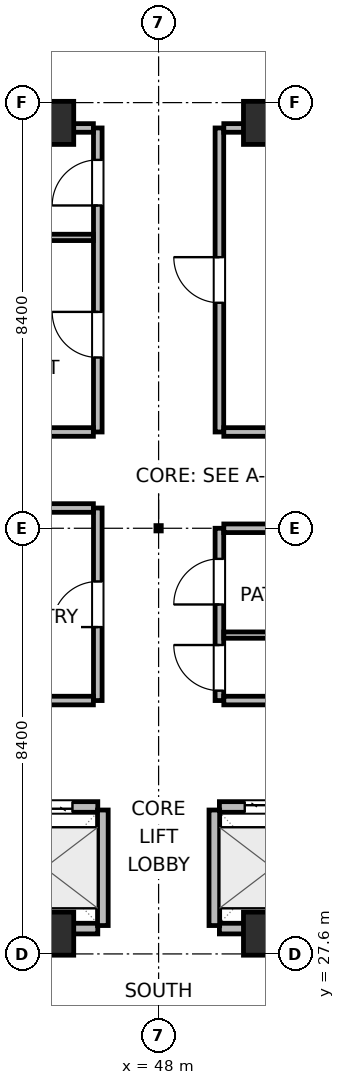
"""IFC4 building model, lengths in metres.
Left out: names, types, materials, properties, quantities, classifications, styles, units other than length and angle.
Written with IfcOpenShell. Run it as: python <this file> out.ifc"""

import sys

from ifc_helpers import new_model, si_unit, direction, frame, frame_2d, origin, origin_2d, place, context, subcontext, project, spatial, rectangle, extrude, element, fill, save


model = new_model("IFC4")
c1 = context("Model", 3, precision=1e-05, world=origin(), true_north=direction((0.0, 1.0)))
c2 = subcontext(c1, "Body", "Model", "MODEL_VIEW")
j1 = project(units=[si_unit("LENGTHUNIT", "METRE"), si_unit("PLANEANGLEUNIT", "RADIAN")], contexts=[c1])
p1 = place(None, origin())
s1 = spatial("IfcSite", under=j1, at=p1, CompositionType="ELEMENT")
p2 = place(p1, origin())
s2 = spatial("IfcBuilding", under=s1, at=p2, CompositionType="ELEMENT")
p3 = place(p2, frame((0.0, 0.0, 25.5)))
s3 = spatial("IfcBuildingStorey", under=s2, at=p3, CompositionType="ELEMENT", Elevation=25.5)
for number, where, z_axis, x_axis in (
    (1, (45.9, 28.0, 0.0), (0.0, 0.0, 1.0), (1.0, 0.0, 0.0)),
    (2, (50.1, 28.0, 0.0), (0.0, 0.0, 1.0), (1.0, 0.0, 0.0)),
    (3, (45.9, 44.0, 0.0), (0.0, 0.0, 1.0), (1.0, 0.0, 0.0)),
    (4, (50.1, 44.0, 0.0), (0.0, 0.0, 1.0), (1.0, 0.0, 0.0)),
):
    element("IfcColumn", number, at=place(p3, frame(where, z_axis=z_axis, x_axis=x_axis)), inside=s3, PredefinedType="COLUMN", context=c2, shape_type="SweptSolid", body=[
        extrude(rectangle(XDim=0.85, YDim=0.85, at=origin_2d()), origin(), (0.0, 0.0, 1.0), 3.9),
    ])
p4 = place(p3, frame((44.7, 30.5, 0.0), z_axis=(0.0, 0.0, 1.0), x_axis=(1.0, 0.0, 0.0)))
e5 = element("IfcWall", 5, at=p4, inside=s3, PredefinedType="PARTITIONING", context=c2, shape_type="SweptSolid", body=[
    extrude(rectangle(XDim=2.1, YDim=0.21, at=frame_2d((1.05, 0.0))), origin(), (0.0, 0.0, 1.0), 3.64),
])
p5 = place(p4, frame((0.5, 0.0, 0.0)))
e6 = element("IfcOpeningElement", 6, at=p5, cuts=e5, PredefinedType="OPENING", context=c2, shape_type="SweptSolid", body=[
    extrude(rectangle(XDim=1.1, YDim=2.04, at=frame_2d((0.55, 1.02))), frame((0.0, 0.115, 0.0), z_axis=(0.0, -1.0, 0.0), x_axis=(1.0, 0.0, 0.0)), (0.0, 0.0, 1.0), 0.23),
])
p6 = place(p3, frame((44.7, 28.1, 0.0), z_axis=(0.0, 0.0, 1.0), x_axis=(1.0, 0.0, 0.0)))
e7 = element("IfcWall", 7, at=p6, inside=s3, PredefinedType="PARTITIONING", context=c2, shape_type="SweptSolid", body=[
    extrude(rectangle(XDim=2.1, YDim=0.21, at=frame_2d((1.05, 0.0))), origin(), (0.0, 0.0, 1.0), 2.525),
])
p7 = place(p3, frame((46.9, 28.16, 0.0), z_axis=(0.0, 0.0, 1.0), x_axis=(0.0, 1.0, 0.0)))
e8 = element("IfcWall", 8, at=p7, inside=s3, PredefinedType="PARTITIONING", context=c2, shape_type="SweptSolid", body=[
    extrude(rectangle(XDim=2.28, YDim=0.21, at=frame_2d((1.14, 0.0))), origin(), (0.0, 0.0, 1.0), 3.64),
])
p8 = place(p3, frame((49.2, 30.5, 0.0), z_axis=(0.0, 0.0, 1.0), x_axis=(1.0, 0.0, 0.0)))
e9 = element("IfcWall", 9, at=p8, inside=s3, PredefinedType="PARTITIONING", context=c2, shape_type="SweptSolid", body=[
    extrude(rectangle(XDim=2.1, YDim=0.21, at=frame_2d((1.05, 0.0))), origin(), (0.0, 0.0, 1.0), 3.64),
])
p9 = place(p8, frame((0.5, 0.0, 0.0)))
e10 = element("IfcOpeningElement", 10, at=p9, cuts=e9, PredefinedType="OPENING", context=c2, shape_type="SweptSolid", body=[
    extrude(rectangle(XDim=1.1, YDim=2.04, at=frame_2d((0.55, 1.02))), frame((0.0, 0.115, 0.0), z_axis=(0.0, -1.0, 0.0), x_axis=(1.0, 0.0, 0.0)), (0.0, 0.0, 1.0), 0.23),
])
p10 = place(p3, frame((49.2, 28.1, 0.0), z_axis=(0.0, 0.0, 1.0), x_axis=(1.0, 0.0, 0.0)))
e11 = element("IfcWall", 11, at=p10, inside=s3, PredefinedType="PARTITIONING", context=c2, shape_type="SweptSolid", body=[
    extrude(rectangle(XDim=2.1, YDim=0.21, at=frame_2d((1.05, 0.0))), origin(), (0.0, 0.0, 1.0), 2.525),
])
p11 = place(p3, frame((49.1, 28.16, 0.0), z_axis=(0.0, 0.0, 1.0), x_axis=(0.0, 1.0, 0.0)))
e12 = element("IfcWall", 12, at=p11, inside=s3, PredefinedType="PARTITIONING", context=c2, shape_type="SweptSolid", body=[
    extrude(rectangle(XDim=2.28, YDim=0.21, at=frame_2d((1.14, 0.0))), origin(), (0.0, 0.0, 1.0), 3.64),
])
p12 = place(p3, frame((46.8, 32.6, 0.0), z_axis=(0.0, 0.0, 1.0), x_axis=(0.0, 1.0, 0.0)))
e13 = element("IfcWall", 13, at=p12, inside=s3, PredefinedType="PARTITIONING", context=c2, shape_type="SweptSolid", body=[
    extrude(rectangle(XDim=3.8, YDim=0.17, at=frame_2d((1.9, 0.0))), origin(), (0.0, 0.0, 1.0), 3.64),
])
p13 = place(p12, frame((1.45, 0.0, 0.0)))
e14 = element("IfcOpeningElement", 14, at=p13, cuts=e13, PredefinedType="OPENING", context=c2, shape_type="SweptSolid", body=[
    extrude(rectangle(XDim=0.9, YDim=2.02, at=frame_2d((0.45, 1.01))), frame((0.0, 0.095, 0.0), z_axis=(0.0, -1.0, 0.0), x_axis=(1.0, 0.0, 0.0)), (0.0, 0.0, 1.0), 0.19),
])
for number, where, z_axis, x_axis in (
    (15, (43.8, 32.6, 0.0), (0.0, 0.0, 1.0), (1.0, 0.0, 0.0)),
    (16, (43.8, 36.4, 0.0), (0.0, 0.0, 1.0), (1.0, 0.0, 0.0)),
):
    element("IfcWall", number, at=place(p3, frame(where, z_axis=z_axis, x_axis=x_axis)), inside=s3, PredefinedType="PARTITIONING", context=c2, shape_type="SweptSolid", body=[
        extrude(rectangle(XDim=2.913, YDim=0.17, at=frame_2d((1.457, 0.0))), origin(), (0.0, 0.0, 1.0), 3.64),
    ])
p14 = place(p3, frame((49.2, 32.6, 0.0), z_axis=(0.0, 0.0, 1.0), x_axis=(0.0, 1.0, 0.0)))
e17 = element("IfcWall", 17, at=p14, inside=s3, PredefinedType="PARTITIONING", context=c2, shape_type="SweptSolid", body=[
    extrude(rectangle(XDim=3.4, YDim=0.17, at=frame_2d((1.7, 0.0))), origin(), (0.0, 0.0, 1.0), 3.64),
])
p15 = place(p14, frame((0.196, 0.0, 0.0)))
e18 = element("IfcOpeningElement", 18, at=p15, cuts=e17, PredefinedType="OPENING", context=c2, shape_type="SweptSolid", body=[
    extrude(rectangle(XDim=0.9, YDim=2.02, at=frame_2d((0.45, 1.01))), frame((0.0, 0.095, 0.0), z_axis=(0.0, -1.0, 0.0), x_axis=(1.0, 0.0, 0.0)), (0.0, 0.0, 1.0), 0.19),
])
p16 = place(p14, frame((1.896, 0.0, 0.0)))
e19 = element("IfcOpeningElement", 19, at=p16, cuts=e17, PredefinedType="OPENING", context=c2, shape_type="SweptSolid", body=[
    extrude(rectangle(XDim=0.9, YDim=2.02, at=frame_2d((0.45, 1.01))), frame((0.0, 0.095, 0.0), z_axis=(0.0, -1.0, 0.0), x_axis=(1.0, 0.0, 0.0)), (0.0, 0.0, 1.0), 0.19),
])
for number, where, z_axis, x_axis in (
    (20, (49.287, 32.6, 0.0), (0.0, 0.0, 1.0), (1.0, 0.0, 0.0)),
    (21, (49.287, 36.0, 0.0), (0.0, 0.0, 1.0), (1.0, 0.0, 0.0)),
):
    element("IfcWall", number, at=place(p3, frame(where, z_axis=z_axis, x_axis=x_axis)), inside=s3, PredefinedType="PARTITIONING", context=c2, shape_type="SweptSolid", body=[
        extrude(rectangle(XDim=2.913, YDim=0.17, at=frame_2d((1.457, 0.0))), origin(), (0.0, 0.0, 1.0), 3.64),
    ])
p17 = place(p3, frame((49.287, 33.892, 0.0), z_axis=(0.0, 0.0, 1.0), x_axis=(1.0, 0.0, 0.0)))
e22 = element("IfcWall", 22, at=p17, inside=s3, PredefinedType="PARTITIONING", context=c2, shape_type="SweptSolid", body=[
    extrude(rectangle(XDim=2.913, YDim=0.125, at=frame_2d((1.457, 0.0))), origin(), (0.0, 0.0, 1.0), 3.64),
])
p18 = place(p3, frame((46.8, 37.9, 0.0), z_axis=(0.0, 0.0, 1.0), x_axis=(0.0, 1.0, 0.0)))
e23 = element("IfcWall", 23, at=p18, inside=s3, PredefinedType="PARTITIONING", context=c2, shape_type="SweptSolid", body=[
    extrude(rectangle(XDim=6.0, YDim=0.17, at=frame_2d((3.0, 0.0))), origin(), (0.0, 0.0, 1.0), 3.64),
])
p19 = place(p18, frame((1.47, 0.0, 0.0)))
e24 = element("IfcOpeningElement", 24, at=p19, cuts=e23, PredefinedType="OPENING", context=c2, shape_type="SweptSolid", body=[
    extrude(rectangle(XDim=0.9, YDim=2.02, at=frame_2d((0.45, 1.01))), frame((0.0, 0.095, 0.0), z_axis=(0.0, -1.0, 0.0), x_axis=(1.0, 0.0, 0.0)), (0.0, 0.0, 1.0), 0.19),
])
p20 = place(p18, frame((4.47, 0.0, 0.0)))
e25 = element("IfcOpeningElement", 25, at=p20, cuts=e23, PredefinedType="OPENING", context=c2, shape_type="SweptSolid", body=[
    extrude(rectangle(XDim=0.9, YDim=2.02, at=frame_2d((0.45, 1.01))), frame((0.0, 0.095, 0.0), z_axis=(0.0, -1.0, 0.0), x_axis=(1.0, 0.0, 0.0)), (0.0, 0.0, 1.0), 0.19),
])
p21 = place(p3, frame((42.5, 37.9, 0.0), z_axis=(0.0, 0.0, 1.0), x_axis=(1.0, 0.0, 0.0)))
e26 = element("IfcWall", 26, at=p21, inside=s3, PredefinedType="PARTITIONING", context=c2, shape_type="SweptSolid", body=[
    extrude(rectangle(XDim=4.213, YDim=0.17, at=frame_2d((2.106, 0.0))), origin(), (0.0, 0.0, 1.0), 3.64),
])
p22 = place(p3, frame((42.5, 43.9, 0.0), z_axis=(0.0, 0.0, 1.0), x_axis=(1.0, 0.0, 0.0)))
e27 = element("IfcWall", 27, at=p22, inside=s3, PredefinedType="PARTITIONING", context=c2, shape_type="SweptSolid", body=[
    extrude(rectangle(XDim=4.213, YDim=0.17, at=frame_2d((2.106, 0.0))), origin(), (0.0, 0.0, 1.0), 2.525),
])
p23 = place(p3, frame((42.5, 41.74, 0.0), z_axis=(0.0, 0.0, 1.0), x_axis=(1.0, 0.0, 0.0)))
e28 = element("IfcWall", 28, at=p23, inside=s3, PredefinedType="PARTITIONING", context=c2, shape_type="SweptSolid", body=[
    extrude(rectangle(XDim=4.213, YDim=0.125, at=frame_2d((2.106, 0.0))), origin(), (0.0, 0.0, 1.0), 3.64),
])
p24 = place(p3, frame((49.2, 37.9, 0.0), z_axis=(0.0, 0.0, 1.0), x_axis=(0.0, 1.0, 0.0)))
e29 = element("IfcWall", 29, at=p24, inside=s3, PredefinedType="PARTITIONING", context=c2, shape_type="SweptSolid", body=[
    extrude(rectangle(XDim=6.0, YDim=0.17, at=frame_2d((3.0, 0.0))), origin(), (0.0, 0.0, 1.0), 3.64),
])
p25 = place(p24, frame((2.55, 0.0, 0.0)))
e30 = element("IfcOpeningElement", 30, at=p25, cuts=e29, PredefinedType="OPENING", context=c2, shape_type="SweptSolid", body=[
    extrude(rectangle(XDim=0.9, YDim=2.02, at=frame_2d((0.45, 1.01))), frame((0.0, 0.095, 0.0), z_axis=(0.0, -1.0, 0.0), x_axis=(1.0, 0.0, 0.0)), (0.0, 0.0, 1.0), 0.19),
])
p26 = place(p3, frame((49.287, 37.9, 0.0), z_axis=(0.0, 0.0, 1.0), x_axis=(1.0, 0.0, 0.0)))
e31 = element("IfcWall", 31, at=p26, inside=s3, PredefinedType="PARTITIONING", context=c2, shape_type="SweptSolid", body=[
    extrude(rectangle(XDim=4.113, YDim=0.17, at=frame_2d((2.056, 0.0))), origin(), (0.0, 0.0, 1.0), 3.64),
])
p27 = place(p3, frame((49.287, 43.9, 0.0), z_axis=(0.0, 0.0, 1.0), x_axis=(1.0, 0.0, 0.0)))
e32 = element("IfcWall", 32, at=p27, inside=s3, PredefinedType="PARTITIONING", context=c2, shape_type="SweptSolid", body=[
    extrude(rectangle(XDim=4.113, YDim=0.17, at=frame_2d((2.056, 0.0))), origin(), (0.0, 0.0, 1.0), 2.525),
])
p28 = place(p5, origin())
e33 = element("IfcDoor", 33, at=p28, inside=s3, OperationType="DOUBLE_DOOR_SLIDING", PredefinedType="DOOR", context=c2, shape_type="SweptSolid", body=[
    extrude(rectangle(XDim=1.1, YDim=2.04, at=frame_2d((0.55, 1.02))), frame((0.0, 0.025, 0.0), z_axis=(0.0, -1.0, 0.0), x_axis=(1.0, 0.0, 0.0)), (0.0, 0.0, 1.0), 0.05),
])
fill(e6, e33)
p29 = place(p9, origin())
e34 = element("IfcDoor", 34, at=p29, inside=s3, OperationType="DOUBLE_DOOR_SLIDING", PredefinedType="DOOR", context=c2, shape_type="SweptSolid", body=[
    extrude(rectangle(XDim=1.1, YDim=2.04, at=frame_2d((0.55, 1.02))), frame((0.0, 0.025, 0.0), z_axis=(0.0, -1.0, 0.0), x_axis=(1.0, 0.0, 0.0)), (0.0, 0.0, 1.0), 0.05),
])
fill(e10, e34)
p30 = place(p13, origin())
e35 = element("IfcDoor", 35, at=p30, inside=s3, OperationType="SINGLE_SWING_LEFT", PredefinedType="DOOR", context=c2, shape_type="SweptSolid", body=[
    extrude(rectangle(XDim=0.9, YDim=2.02, at=frame_2d((0.45, 1.01))), frame((0.0, 0.025, 0.0), z_axis=(0.0, -1.0, 0.0), x_axis=(1.0, 0.0, 0.0)), (0.0, 0.0, 1.0), 0.05),
])
fill(e14, e35)
p31 = place(p15, origin())
e36 = element("IfcDoor", 36, at=p31, inside=s3, OperationType="SINGLE_SWING_RIGHT", PredefinedType="DOOR", context=c2, shape_type="SweptSolid", body=[
    extrude(rectangle(XDim=0.9, YDim=2.02, at=frame_2d((0.45, 1.01))), frame((0.0, 0.025, 0.0), z_axis=(0.0, -1.0, 0.0), x_axis=(1.0, 0.0, 0.0)), (0.0, 0.0, 1.0), 0.05),
])
fill(e18, e36)
p32 = place(p16, origin())
e37 = element("IfcDoor", 37, at=p32, inside=s3, OperationType="SINGLE_SWING_LEFT", PredefinedType="DOOR", context=c2, shape_type="SweptSolid", body=[
    extrude(rectangle(XDim=0.9, YDim=2.02, at=frame_2d((0.45, 1.01))), frame((0.0, 0.025, 0.0), z_axis=(0.0, -1.0, 0.0), x_axis=(1.0, 0.0, 0.0)), (0.0, 0.0, 1.0), 0.05),
])
fill(e19, e37)
p33 = place(p19, origin())
e38 = element("IfcDoor", 38, at=p33, inside=s3, OperationType="SINGLE_SWING_RIGHT", PredefinedType="DOOR", context=c2, shape_type="SweptSolid", body=[
    extrude(rectangle(XDim=0.9, YDim=2.02, at=frame_2d((0.45, 1.01))), frame((0.0, 0.025, 0.0), z_axis=(0.0, -1.0, 0.0), x_axis=(1.0, 0.0, 0.0)), (0.0, 0.0, 1.0), 0.05),
])
fill(e24, e38)
p34 = place(p20, origin())
e39 = element("IfcDoor", 39, at=p34, inside=s3, OperationType="SINGLE_SWING_LEFT", PredefinedType="DOOR", context=c2, shape_type="SweptSolid", body=[
    extrude(rectangle(XDim=0.9, YDim=2.02, at=frame_2d((0.45, 1.01))), frame((0.0, 0.025, 0.0), z_axis=(0.0, -1.0, 0.0), x_axis=(1.0, 0.0, 0.0)), (0.0, 0.0, 1.0), 0.05),
])
fill(e25, e39)
p35 = place(p25, origin())
e40 = element("IfcDoor", 40, at=p35, inside=s3, OperationType="SINGLE_SWING_RIGHT", PredefinedType="DOOR", context=c2, shape_type="SweptSolid", body=[
    extrude(rectangle(XDim=0.9, YDim=2.02, at=frame_2d((0.45, 1.01))), frame((0.0, 0.025, 0.0), z_axis=(0.0, -1.0, 0.0), x_axis=(1.0, 0.0, 0.0)), (0.0, 0.0, 1.0), 0.05),
])
fill(e30, e40)
save(model, sys.argv[1])
